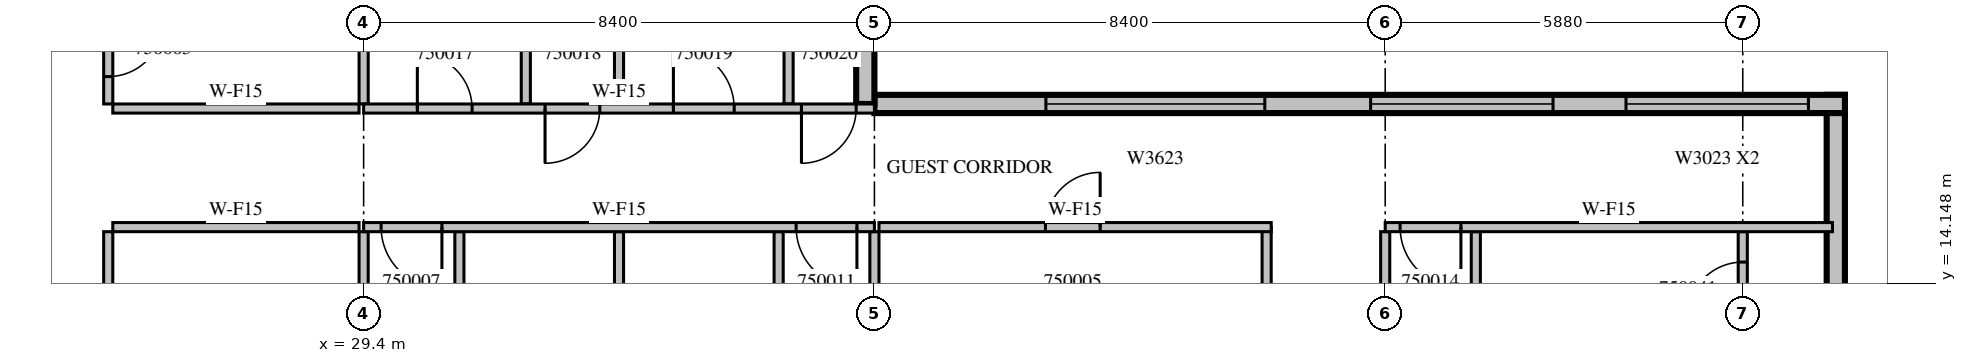
"""IFC4 building model, lengths in metres.
Left out: names, types, materials, properties, quantities, classifications, styles, units other than length and angle.
Written with IfcOpenShell. Run it as: python <this file> out.ifc"""

import sys

from ifc_helpers import new_model, si_unit, direction, frame, frame_2d, origin, place, context, subcontext, project, spatial, rectangle, extrude, source, transform, mapped, element, fill, save


model = new_model("IFC4")
c1 = context("Model", 3, precision=1e-05, world=origin(), true_north=direction((0.0, 1.0)))
c2 = subcontext(c1, "Body", "Model", "MODEL_VIEW")
j1 = project(units=[si_unit("LENGTHUNIT", "METRE"), si_unit("PLANEANGLEUNIT", "RADIAN")], contexts=[c1])
p1 = place(None, origin())
s1 = spatial("IfcSite", under=j1, at=p1, CompositionType="ELEMENT")
p2 = place(p1, origin())
s2 = spatial("IfcBuilding", under=s1, at=p2, CompositionType="ELEMENT")
p3 = place(p2, frame((0.0, 0.0, 223.4)))
s3 = spatial("IfcBuildingStorey", under=s2, at=p3, CompositionType="ELEMENT", Elevation=223.4)
m1 = source(origin(), c2, "Body", "SweptSolid", [
    extrude(rectangle(XDim=6.75, YDim=0.3, at=frame_2d((3.375, 0.0))), origin(), (0.0, 0.0, 1.0), 3.4),
])
p4 = place(p3, frame((53.61, 10.5, 0.0), z_axis=(0.0, 0.0, 1.0), x_axis=(0.0, 1.0, 0.0)))
e1 = element("IfcWall", 1, at=p4, inside=s3, PredefinedType="STANDARD", context=c2, shape_type="MappedRepresentation", body=[
    mapped(m1, transform((0.0, 0.0, 0.0), scale=1.0)),
])
m2 = source(origin(), c2, "Body", "SweptSolid", [
    extrude(rectangle(XDim=1.2, YDim=2.3, at=frame_2d((0.6, 1.15))), frame((0.0, 0.16, 0.0), z_axis=(0.0, -1.0, 0.0), x_axis=(1.0, 0.0, 0.0)), (0.0, 0.0, 1.0), 0.32),
])
p5 = place(p4, frame((1.087, 0.0, 0.6)))
e2 = element("IfcOpeningElement", 2, at=p5, cuts=e1, PredefinedType="OPENING", context=c2, shape_type="MappedRepresentation", body=[
    mapped(m2, transform((0.0, 0.0, 0.0), scale=1.0)),
])
m3 = source(origin(), c2, "Body", "SweptSolid", [
    extrude(rectangle(XDim=15.96, YDim=0.3, at=frame_2d((7.98, 0.0))), origin(), (0.0, 0.0, 1.0), 3.4),
])
p6 = place(p3, frame((53.76, 17.1, 0.0), z_axis=(0.0, 0.0, 1.0), x_axis=(-1.0, 0.0, 0.0)))
e3 = element("IfcWall", 3, at=p6, inside=s3, PredefinedType="STANDARD", context=c2, shape_type="MappedRepresentation", body=[
    mapped(m3, transform((0.0, 0.0, 0.0), scale=1.0)),
])
m4 = source(origin(), c2, "Body", "SweptSolid", [
    extrude(rectangle(XDim=3.0, YDim=2.3, at=frame_2d((1.5, 1.15))), frame((0.0, 0.16, 0.0), z_axis=(0.0, -1.0, 0.0), x_axis=(1.0, 0.0, 0.0)), (0.0, 0.0, 1.0), 0.32),
])
p7 = place(p6, frame((0.6, 0.0, 0.6)))
e4 = element("IfcOpeningElement", 4, at=p7, cuts=e3, PredefinedType="OPENING", context=c2, shape_type="MappedRepresentation", body=[
    mapped(m4, transform((0.0, 0.0, 0.0), scale=1.0)),
])
p8 = place(p6, frame((4.8, 0.0, 0.6)))
e5 = element("IfcOpeningElement", 5, at=p8, cuts=e3, PredefinedType="OPENING", context=c2, shape_type="MappedRepresentation", body=[
    mapped(m4, transform((0.0, 0.0, 0.0), scale=1.0)),
])
m5 = source(origin(), c2, "Body", "SweptSolid", [
    extrude(rectangle(XDim=3.6, YDim=2.3, at=frame_2d((1.8, 1.15))), frame((0.0, 0.16, 0.0), z_axis=(0.0, -1.0, 0.0), x_axis=(1.0, 0.0, 0.0)), (0.0, 0.0, 1.0), 0.32),
])
p9 = place(p6, frame((9.54, 0.0, 0.6)))
e6 = element("IfcOpeningElement", 6, at=p9, cuts=e3, PredefinedType="OPENING", context=c2, shape_type="MappedRepresentation", body=[
    mapped(m5, transform((0.0, 0.0, 0.0), scale=1.0)),
])
m6 = source(origin(), c2, "Body", "SweptSolid", [
    extrude(rectangle(XDim=3.0, YDim=0.3, at=frame_2d((1.5, 0.0))), origin(), (0.0, 0.0, 1.0), 3.4),
])
p10 = place(p3, frame((37.65, 17.1, 0.0), z_axis=(0.0, 0.0, 1.0), x_axis=(0.0, 1.0, 0.0)))
e7 = element("IfcWall", 7, at=p10, inside=s3, PredefinedType="STANDARD", context=c2, shape_type="MappedRepresentation", body=[
    mapped(m6, transform((0.0, 0.0, 0.0), scale=1.0)),
])
p11 = place(p10, frame((1.425, 0.0, 0.6)))
e8 = element("IfcOpeningElement", 8, at=p11, cuts=e7, PredefinedType="OPENING", context=c2, shape_type="MappedRepresentation", body=[
    mapped(m2, transform((0.0, 0.0, 0.0), scale=1.0)),
])
m7 = source(origin(), c2, "Body", "SweptSolid", [
    extrude(rectangle(XDim=11.525, YDim=0.15, at=frame_2d((5.763, 0.0))), origin(), (0.0, 0.0, 1.0), 3.4),
])
p12 = place(p3, frame((25.2, 15.0, 0.0), z_axis=(0.0, 0.0, 1.0), x_axis=(0.0, -1.0, 0.0)))
e9 = element("IfcWall", 9, at=p12, inside=s3, PredefinedType="PARTITIONING", context=c2, shape_type="MappedRepresentation", body=[
    mapped(m7, transform((0.0, 0.0, 0.0), scale=1.0)),
])
m8 = source(origin(), c2, "Body", "SweptSolid", [
    extrude(rectangle(XDim=0.9, YDim=2.1, at=frame_2d((0.45, 1.05))), frame((0.0, 0.085, 0.0), z_axis=(0.0, -1.0, 0.0), x_axis=(1.0, 0.0, 0.0)), (0.0, 0.0, 1.0), 0.17),
])
p13 = place(p12, frame((7.562, 0.0, 0.0)))
e10 = element("IfcOpeningElement", 10, at=p13, cuts=e9, PredefinedType="OPENING", context=c2, shape_type="MappedRepresentation", body=[
    mapped(m8, transform((0.0, 0.0, 0.0), scale=1.0)),
])
p14 = place(p12, frame((0.925, 0.0, 0.0)))
e11 = element("IfcOpeningElement", 11, at=p14, cuts=e9, PredefinedType="OPENING", context=c2, shape_type="MappedRepresentation", body=[
    mapped(m8, transform((0.0, 0.0, 0.0), scale=1.0)),
])
m9 = source(origin(), c2, "Body", "SweptSolid", [
    extrude(rectangle(XDim=3.6, YDim=0.15, at=frame_2d((1.8, 0.0))), origin(), (0.0, 0.0, 1.0), 3.4),
])
p15 = place(p3, frame((25.2, 20.7, 0.0), z_axis=(0.0, 0.0, 1.0), x_axis=(0.0, -1.0, 0.0)))
e12 = element("IfcWall", 12, at=p15, inside=s3, PredefinedType="PARTITIONING", context=c2, shape_type="MappedRepresentation", body=[
    mapped(m9, transform((0.0, 0.0, 0.0), scale=1.0)),
])
p16 = place(p15, frame((2.25, 0.0, 0.0)))
e13 = element("IfcOpeningElement", 13, at=p16, cuts=e12, PredefinedType="OPENING", context=c2, shape_type="MappedRepresentation", body=[
    mapped(m8, transform((0.0, 0.0, 0.0), scale=1.0)),
])
m10 = source(origin(), c2, "Body", "SweptSolid", [
    extrude(rectangle(XDim=4.05, YDim=0.15, at=frame_2d((2.025, 0.0))), origin(), (0.0, 0.0, 1.0), 3.4),
])
for number, where, z_axis, x_axis in (
    (14, (29.325, 15.075, 0.0), (0.0, 0.0, 1.0), (-1.0, 0.0, 0.0)),
    (15, (25.275, 17.025, 0.0), (0.0, 0.0, 1.0), (1.0, 0.0, 0.0)),
):
    element("IfcWall", number, at=place(p3, frame(where, z_axis=z_axis, x_axis=x_axis)), inside=s3, PredefinedType="PARTITIONING", context=c2, shape_type="MappedRepresentation", body=[
        mapped(m10, transform((0.0, 0.0, 0.0), scale=1.0)),
    ])
m11 = source(origin(), c2, "Body", "SweptSolid", [
    extrude(rectangle(XDim=4.051, YDim=0.15, at=frame_2d((2.026, 0.0))), origin(), (0.0, 0.0, 1.0), 3.4),
])
p17 = place(p3, frame((29.4, 10.949, 0.0), z_axis=(0.0, 0.0, 1.0), x_axis=(0.0, 1.0, 0.0)))
e16 = element("IfcWall", 16, at=p17, inside=s3, PredefinedType="PARTITIONING", context=c2, shape_type="MappedRepresentation", body=[
    mapped(m11, transform((0.0, 0.0, 0.0), scale=1.0)),
])
m12 = source(origin(), c2, "Body", "SweptSolid", [
    extrude(rectangle(XDim=3.001, YDim=0.15, at=frame_2d((1.5, 0.0))), origin(), (0.0, 0.0, 1.0), 3.4),
])
p18 = place(p3, frame((29.4, 17.1, 0.0), z_axis=(0.0, 0.0, 1.0), x_axis=(0.0, 1.0, 0.0)))
e17 = element("IfcWall", 17, at=p18, inside=s3, PredefinedType="PARTITIONING", context=c2, shape_type="MappedRepresentation", body=[
    mapped(m12, transform((0.0, 0.0, 0.0), scale=1.0)),
])
m13 = source(origin(), c2, "Body", "SweptSolid", [
    extrude(rectangle(XDim=3.175, YDim=0.15, at=frame_2d((1.587, 0.0))), origin(), (0.0, 0.0, 1.0), 3.4),
])
p19 = place(p3, frame((44.25, 11.9, 0.0), z_axis=(0.0, 0.0, 1.0), x_axis=(0.0, 1.0, 0.0)))
e18 = element("IfcWall", 18, at=p19, inside=s3, PredefinedType="PARTITIONING", context=c2, shape_type="MappedRepresentation", body=[
    mapped(m13, transform((0.0, 0.0, 0.0), scale=1.0)),
])
m14 = source(origin(), c2, "Body", "SweptSolid", [
    extrude(rectangle(XDim=6.45, YDim=0.15, at=frame_2d((3.225, 0.0))), origin(), (0.0, 0.0, 1.0), 3.4),
])
p20 = place(p3, frame((44.325, 15.075, 0.0), z_axis=(0.0, 0.0, 1.0), x_axis=(-1.0, 0.0, 0.0)))
e19 = element("IfcWall", 19, at=p20, inside=s3, PredefinedType="PARTITIONING", context=c2, shape_type="MappedRepresentation", body=[
    mapped(m14, transform((0.0, 0.0, 0.0), scale=1.0)),
])
p21 = place(p20, frame((2.812, 0.0, 0.0)))
e20 = element("IfcOpeningElement", 20, at=p21, cuts=e19, PredefinedType="OPENING", context=c2, shape_type="MappedRepresentation", body=[
    mapped(m8, transform((0.0, 0.0, 0.0), scale=1.0)),
])
m15 = source(origin(), c2, "Body", "SweptSolid", [
    extrude(rectangle(XDim=3.9, YDim=0.15, at=frame_2d((1.95, 0.0))), origin(), (0.0, 0.0, 1.0), 3.4),
])
for number, where, z_axis, x_axis in (
    (21, (30.975, 11.1, 0.0), (0.0, 0.0, 1.0), (0.0, 1.0, 0.0)),
    (22, (33.6, 11.1, 0.0), (0.0, 0.0, 1.0), (0.0, 1.0, 0.0)),
    (23, (36.225, 11.1, 0.0), (0.0, 0.0, 1.0), (0.0, 1.0, 0.0)),
    (24, (37.8, 11.1, 0.0), (0.0, 0.0, 1.0), (0.0, 1.0, 0.0)),
    (25, (47.69, 11.1, 0.0), (0.0, 0.0, 1.0), (0.0, 1.0, 0.0)),
):
    element("IfcWall", number, at=place(p3, frame(where, z_axis=z_axis, x_axis=x_axis)), inside=s3, PredefinedType="PARTITIONING", context=c2, shape_type="MappedRepresentation", body=[
        mapped(m15, transform((0.0, 0.0, 0.0), scale=1.0)),
    ])
p22 = place(p3, frame((52.08, 11.1, 0.0), z_axis=(0.0, 0.0, 1.0), x_axis=(0.0, 1.0, 0.0)))
e26 = element("IfcWall", 26, at=p22, inside=s3, PredefinedType="PARTITIONING", context=c2, shape_type="MappedRepresentation", body=[
    mapped(m15, transform((0.0, 0.0, 0.0), scale=1.0)),
])
p23 = place(p22, frame((1.5, 0.0, 0.0)))
e27 = element("IfcOpeningElement", 27, at=p23, cuts=e26, PredefinedType="OPENING", context=c2, shape_type="MappedRepresentation", body=[
    mapped(m8, transform((0.0, 0.0, 0.0), scale=1.0)),
])
p24 = place(p22, frame((2.5, 0.0, 0.0)))
e28 = element("IfcOpeningElement", 28, at=p24, cuts=e26, PredefinedType="OPENING", context=c2, shape_type="MappedRepresentation", body=[
    mapped(m8, transform((0.0, 0.0, 0.0), scale=1.0)),
])
p25 = place(p22, frame((0.5, 0.0, 0.0)))
e29 = element("IfcOpeningElement", 29, at=p25, cuts=e26, PredefinedType="OPENING", context=c2, shape_type="MappedRepresentation", body=[
    mapped(m8, transform((0.0, 0.0, 0.0), scale=1.0)),
])
p26 = place(p3, frame((46.2, 11.1, 0.0), z_axis=(0.0, 0.0, 1.0), x_axis=(0.0, 1.0, 0.0)))
e30 = element("IfcWall", 30, at=p26, inside=s3, PredefinedType="PARTITIONING", context=c2, shape_type="MappedRepresentation", body=[
    mapped(m15, transform((0.0, 0.0, 0.0), scale=1.0)),
])
for number, where, z_axis, x_axis in (
    (31, (32.067, 20.7, 0.0), (0.0, 0.0, 1.0), (0.0, -1.0, 0.0)),
    (32, (36.389, 20.7, 0.0), (0.0, 0.0, 1.0), (0.0, -1.0, 0.0)),
    (33, (33.6, 17.1, 0.0), (0.0, 0.0, 1.0), (0.0, 1.0, 0.0)),
):
    element("IfcWall", number, at=place(p3, frame(where, z_axis=z_axis, x_axis=x_axis)), inside=s3, PredefinedType="PARTITIONING", context=c2, shape_type="MappedRepresentation", body=[
        mapped(m9, transform((0.0, 0.0, 0.0), scale=1.0)),
    ])
m16 = source(origin(), c2, "Body", "SweptSolid", [
    extrude(rectangle(XDim=8.4, YDim=0.15, at=frame_2d((4.2, 0.0))), origin(), (0.0, 0.0, 1.0), 3.4),
])
p27 = place(p3, frame((37.8, 15.075, 0.0), z_axis=(0.0, 0.0, 1.0), x_axis=(-1.0, 0.0, 0.0)))
e34 = element("IfcWall", 34, at=p27, inside=s3, PredefinedType="PARTITIONING", context=c2, shape_type="MappedRepresentation", body=[
    mapped(m16, transform((0.0, 0.0, 0.0), scale=1.0)),
])
m17 = source(origin(), c2, "Body", "SweptSolid", [
    extrude(rectangle(XDim=1.0, YDim=2.1, at=frame_2d((0.5, 1.05))), frame((0.0, 0.085, 0.0), z_axis=(0.0, -1.0, 0.0), x_axis=(1.0, 0.0, 0.0)), (0.0, 0.0, 1.0), 0.17),
])
p28 = place(p27, frame((7.112, 0.0, 0.0)))
e35 = element("IfcOpeningElement", 35, at=p28, cuts=e34, PredefinedType="OPENING", context=c2, shape_type="MappedRepresentation", body=[
    mapped(m17, transform((0.0, 0.0, 0.0), scale=1.0)),
])
p29 = place(p27, frame((0.287, 0.0, 0.0)))
e36 = element("IfcOpeningElement", 36, at=p29, cuts=e34, PredefinedType="OPENING", context=c2, shape_type="MappedRepresentation", body=[
    mapped(m17, transform((0.0, 0.0, 0.0), scale=1.0)),
])
m18 = source(origin(), c2, "Body", "SweptSolid", [
    extrude(rectangle(XDim=7.355, YDim=0.15, at=frame_2d((3.678, 0.0))), origin(), (0.0, 0.0, 1.0), 3.4),
])
p30 = place(p3, frame((53.555, 15.075, 0.0), z_axis=(0.0, 0.0, 1.0), x_axis=(-1.0, 0.0, 0.0)))
e37 = element("IfcWall", 37, at=p30, inside=s3, PredefinedType="PARTITIONING", context=c2, shape_type="MappedRepresentation", body=[
    mapped(m18, transform((0.0, 0.0, 0.0), scale=1.0)),
])
p31 = place(p30, frame((6.11, 0.0, 0.0)))
e38 = element("IfcOpeningElement", 38, at=p31, cuts=e37, PredefinedType="OPENING", context=c2, shape_type="MappedRepresentation", body=[
    mapped(m17, transform((0.0, 0.0, 0.0), scale=1.0)),
])
p32 = place(p3, frame((29.4, 17.025, 0.0), z_axis=(0.0, 0.0, 1.0), x_axis=(1.0, 0.0, 0.0)))
e39 = element("IfcWall", 39, at=p32, inside=s3, PredefinedType="PARTITIONING", context=c2, shape_type="MappedRepresentation", body=[
    mapped(m16, transform((0.0, 0.0, 0.0), scale=1.0)),
])
p33 = place(p32, frame((0.883, 0.0, 0.0)))
e40 = element("IfcOpeningElement", 40, at=p33, cuts=e39, PredefinedType="OPENING", context=c2, shape_type="MappedRepresentation", body=[
    mapped(m8, transform((0.0, 0.0, 0.0), scale=1.0)),
])
p34 = place(p32, frame((2.983, 0.0, 0.0)))
e41 = element("IfcOpeningElement", 41, at=p34, cuts=e39, PredefinedType="OPENING", context=c2, shape_type="MappedRepresentation", body=[
    mapped(m8, transform((0.0, 0.0, 0.0), scale=1.0)),
])
p35 = place(p32, frame((5.094, 0.0, 0.0)))
e42 = element("IfcOpeningElement", 42, at=p35, cuts=e39, PredefinedType="OPENING", context=c2, shape_type="MappedRepresentation", body=[
    mapped(m17, transform((0.0, 0.0, 0.0), scale=1.0)),
])
p36 = place(p32, frame((7.2, 0.0, 0.0)))
e43 = element("IfcOpeningElement", 43, at=p36, cuts=e39, PredefinedType="OPENING", context=c2, shape_type="MappedRepresentation", body=[
    mapped(m8, transform((0.0, 0.0, 0.0), scale=1.0)),
])
m19 = source(origin(), c2, "Body", "SweptSolid", [
    extrude(rectangle(XDim=3.0, YDim=2.3, at=frame_2d((1.5, 1.15))), frame((0.0, 0.03, 0.0), z_axis=(0.0, -1.0, 0.0), x_axis=(1.0, 0.0, 0.0)), (0.0, 0.0, 1.0), 0.06),
])
p37 = place(p7, origin())
e44 = element("IfcWindow", 44, at=p37, inside=s3, PartitioningType="SINGLE_PANEL", PredefinedType="WINDOW", context=c2, shape_type="MappedRepresentation", body=[
    mapped(m19, transform((0.0, 0.0, 0.0), scale=1.0)),
])
fill(e4, e44)
p38 = place(p8, origin())
e45 = element("IfcWindow", 45, at=p38, inside=s3, PartitioningType="SINGLE_PANEL", PredefinedType="WINDOW", context=c2, shape_type="MappedRepresentation", body=[
    mapped(m19, transform((0.0, 0.0, 0.0), scale=1.0)),
])
fill(e5, e45)
m20 = source(origin(), c2, "Body", "SweptSolid", [
    extrude(rectangle(XDim=3.6, YDim=2.3, at=frame_2d((1.8, 1.15))), frame((0.0, 0.03, 0.0), z_axis=(0.0, -1.0, 0.0), x_axis=(1.0, 0.0, 0.0)), (0.0, 0.0, 1.0), 0.06),
])
p39 = place(p9, origin())
e46 = element("IfcWindow", 46, at=p39, inside=s3, PartitioningType="SINGLE_PANEL", PredefinedType="WINDOW", context=c2, shape_type="MappedRepresentation", body=[
    mapped(m20, transform((0.0, 0.0, 0.0), scale=1.0)),
])
fill(e6, e46)
m21 = source(origin(), c2, "Body", "SweptSolid", [
    extrude(rectangle(XDim=0.9, YDim=2.1, at=frame_2d((0.45, 1.05))), frame((0.0, 0.025, 0.0), z_axis=(0.0, -1.0, 0.0), x_axis=(1.0, 0.0, 0.0)), (0.0, 0.0, 1.0), 0.05),
])
p40 = place(p16, origin())
e47 = element("IfcDoor", 47, at=p40, inside=s3, OperationType="SINGLE_SWING_LEFT", PredefinedType="DOOR", context=c2, shape_type="MappedRepresentation", body=[
    mapped(m21, transform((0.0, 0.0, 0.0), scale=1.0)),
])
fill(e13, e47)
p41 = place(p21, origin())
e48 = element("IfcDoor", 48, at=p41, inside=s3, OperationType="SINGLE_SWING_RIGHT", PredefinedType="DOOR", context=c2, shape_type="MappedRepresentation", body=[
    mapped(m21, transform((0.0, 0.0, 0.0), scale=1.0)),
])
fill(e20, e48)
m22 = source(origin(), c2, "Body", "SweptSolid", [
    extrude(rectangle(XDim=1.0, YDim=2.1, at=frame_2d((0.5, 1.05))), frame((0.0, 0.025, 0.0), z_axis=(0.0, -1.0, 0.0), x_axis=(1.0, 0.0, 0.0)), (0.0, 0.0, 1.0), 0.05),
])
p42 = place(p28, origin())
e49 = element("IfcDoor", 49, at=p42, inside=s3, OperationType="SINGLE_SWING_LEFT", PredefinedType="DOOR", context=c2, shape_type="MappedRepresentation", body=[
    mapped(m22, transform((0.0, 0.0, 0.0), scale=1.0)),
])
fill(e35, e49)
p43 = place(p29, origin())
e50 = element("IfcDoor", 50, at=p43, inside=s3, OperationType="SINGLE_SWING_LEFT", PredefinedType="DOOR", context=c2, shape_type="MappedRepresentation", body=[
    mapped(m22, transform((0.0, 0.0, 0.0), scale=1.0)),
])
fill(e36, e50)
p44 = place(p31, origin())
e51 = element("IfcDoor", 51, at=p44, inside=s3, OperationType="SINGLE_SWING_LEFT", PredefinedType="DOOR", context=c2, shape_type="MappedRepresentation", body=[
    mapped(m22, transform((0.0, 0.0, 0.0), scale=1.0)),
])
fill(e38, e51)
p45 = place(p33, origin())
e52 = element("IfcDoor", 52, at=p45, inside=s3, OperationType="SINGLE_SWING_LEFT", PredefinedType="DOOR", context=c2, shape_type="MappedRepresentation", body=[
    mapped(m21, transform((0.0, 0.0, 0.0), scale=1.0)),
])
fill(e40, e52)
p46 = place(p34, origin())
e53 = element("IfcDoor", 53, at=p46, inside=s3, OperationType="SINGLE_SWING_RIGHT", PredefinedType="DOOR", context=c2, shape_type="MappedRepresentation", body=[
    mapped(m21, transform((0.0, 0.0, 0.0), scale=1.0)),
])
fill(e41, e53)
p47 = place(p35, origin())
e54 = element("IfcDoor", 54, at=p47, inside=s3, OperationType="SINGLE_SWING_LEFT", PredefinedType="DOOR", context=c2, shape_type="MappedRepresentation", body=[
    mapped(m22, transform((0.0, 0.0, 0.0), scale=1.0)),
])
fill(e42, e54)
p48 = place(p36, origin())
e55 = element("IfcDoor", 55, at=p48, inside=s3, OperationType="SINGLE_SWING_RIGHT", PredefinedType="DOOR", context=c2, shape_type="MappedRepresentation", body=[
    mapped(m21, transform((0.0, 0.0, 0.0), scale=1.0)),
])
fill(e43, e55)
p49 = place(p24, origin())
e56 = element("IfcDoor", 56, at=p49, inside=s3, OperationType="SINGLE_SWING_LEFT", PredefinedType="DOOR", context=c2, shape_type="MappedRepresentation", body=[
    mapped(m21, transform((0.0, 0.0, 0.0), scale=1.0)),
])
fill(e28, e56)
save(model, sys.argv[1])
